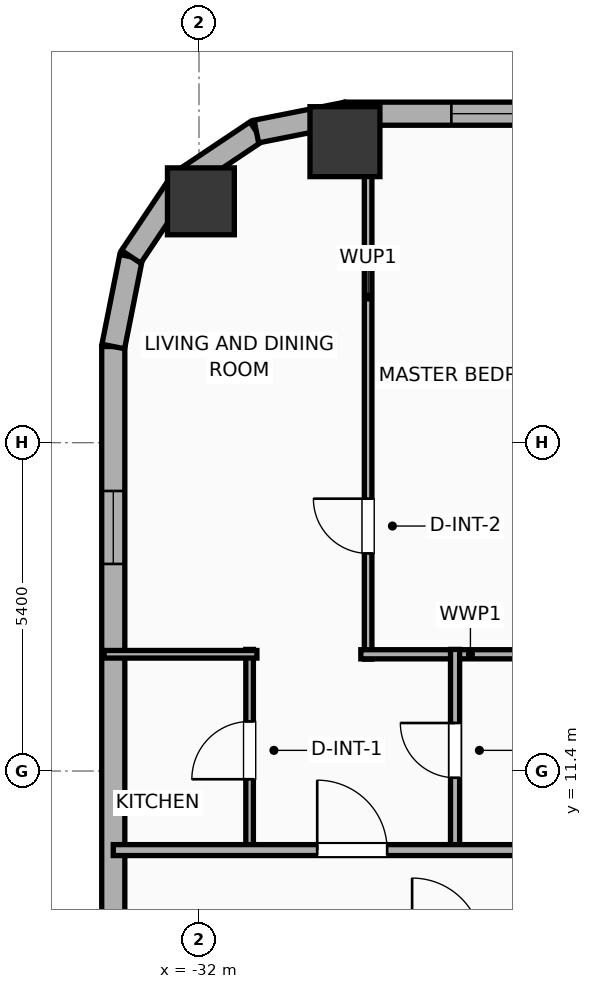
"""IFC4 building model, lengths in metres.
Left out: names, types, materials, properties, quantities, classifications, styles, units other than length and angle.
Written with IfcOpenShell. Run it as: python <this file> out.ifc"""

import sys

from ifc_helpers import new_model, si_unit, direction, frame, frame_2d, origin, origin_2d, place, context, subcontext, project, spatial, rectangle, hollow_rectangle, hollow_circle, extrude, element, fill, save


model = new_model("IFC4")
c1 = context("Model", 3, precision=1e-05, world=origin(), true_north=direction((0.0, 1.0)))
c2 = subcontext(c1, "Body", "Model", "MODEL_VIEW")
j1 = project(units=[si_unit("LENGTHUNIT", "METRE"), si_unit("PLANEANGLEUNIT", "RADIAN")], contexts=[c1])
p1 = place(None, origin())
s1 = spatial("IfcSite", under=j1, at=p1, CompositionType="ELEMENT")
p2 = place(p1, origin())
s2 = spatial("IfcBuilding", under=s1, at=p2, CompositionType="ELEMENT")
p3 = place(p2, frame((0.0, 0.0, 45.5)))
s3 = spatial("IfcBuildingStorey", under=s2, at=p3, CompositionType="ELEMENT", Elevation=45.5)
p4 = place(p3, frame((-29.6, 21.75, 0.0), z_axis=(0.0, 0.0, 1.0), x_axis=(1.0, 0.0, 0.0)))
e1 = element("IfcColumn", 1, at=p4, inside=s3, PredefinedType="COLUMN", context=c2, shape_type="SweptSolid", body=[
    extrude(hollow_rectangle(XDim=1.15, YDim=1.15, WallThickness=0.04, at=origin_2d()), origin(), (0.0, 0.0, 1.0), 3.9),
])
p5 = place(p3, frame((-31.969, 20.769, 0.0), z_axis=(0.0, 0.0, 1.0), x_axis=(1.0, 0.0, 0.0)))
e2 = element("IfcColumn", 2, at=p5, inside=s3, PredefinedType="COLUMN", context=c2, shape_type="SweptSolid", body=[
    extrude(hollow_circle(Radius=0.55, WallThickness=0.036, at=origin_2d()), origin(), (0.0, 0.0, 1.0), 3.9),
])
p6 = place(p3, frame((-33.41, -18.381, 0.0), z_axis=(0.0, 0.0, 1.0), x_axis=(0.0, 1.0, 0.0)))
e3 = element("IfcWall", 3, at=p6, inside=s3, PredefinedType="ELEMENTEDWALL", context=c2, shape_type="SweptSolid", body=[
    extrude(rectangle(XDim=36.763, YDim=0.38, at=frame_2d((18.381, 0.0))), origin(), (0.0, 0.0, 1.0), 3.65),
])
p7 = place(p6, frame((33.187, 0.0, 0.75)))
e4 = element("IfcOpeningElement", 4, at=p7, cuts=e3, PredefinedType="OPENING", context=c2, shape_type="SweptSolid", body=[
    extrude(rectangle(XDim=1.2, YDim=2.05, at=frame_2d((0.6, 1.025))), frame((0.0, 0.2, 0.0), z_axis=(0.0, -1.0, 0.0), x_axis=(1.0, 0.0, 0.0)), (0.0, 0.0, 1.0), 0.4),
])
p8 = place(p6, frame((22.126, 0.0, 0.75)))
e5 = element("IfcOpeningElement", 5, at=p8, cuts=e3, PredefinedType="OPENING", context=c2, shape_type="SweptSolid", body=[
    extrude(rectangle(XDim=1.2, YDim=2.05, at=frame_2d((0.6, 1.025))), frame((0.0, 0.2, 0.0), z_axis=(0.0, -1.0, 0.0), x_axis=(1.0, 0.0, 0.0)), (0.0, 0.0, 1.0), 0.4),
])
p9 = place(p6, frame((13.576, 0.0, 0.75)))
e6 = element("IfcOpeningElement", 6, at=p9, cuts=e3, PredefinedType="OPENING", context=c2, shape_type="SweptSolid", body=[
    extrude(rectangle(XDim=1.2, YDim=2.05, at=frame_2d((0.6, 1.025))), frame((0.0, 0.2, 0.0), z_axis=(0.0, -1.0, 0.0), x_axis=(1.0, 0.0, 0.0)), (0.0, 0.0, 1.0), 0.4),
])
p10 = place(p3, frame((-33.41, 18.381, 0.0), z_axis=(0.0, 0.0, 1.0), x_axis=(0.195086038585, 0.980786132421, 0.0)))
e7 = element("IfcWall", 7, at=p10, inside=s3, PredefinedType="ELEMENTEDWALL", context=c2, shape_type="SweptSolid", body=[
    extrude(rectangle(XDim=1.504, YDim=0.38, at=frame_2d((0.752, 0.0))), origin(), (0.0, 0.0, 1.0), 3.65),
])
p11 = place(p3, frame((-33.116, 19.857, 0.0), z_axis=(0.0, 0.0, 1.0), x_axis=(0.555572577804, 0.831468045563, 0.0)))
e8 = element("IfcWall", 8, at=p11, inside=s3, PredefinedType="ELEMENTEDWALL", context=c2, shape_type="SweptSolid", body=[
    extrude(rectangle(XDim=1.485, YDim=0.38, at=frame_2d((0.742, 0.0))), origin(), (0.0, 0.0, 1.0), 3.65),
])
p12 = place(p3, frame((-32.292, 21.091, 0.0), z_axis=(0.0, 0.0, 1.0), x_axis=(0.831442848281, 0.555610286119, 0.0)))
e9 = element("IfcWall", 9, at=p12, inside=s3, PredefinedType="ELEMENTEDWALL", context=c2, shape_type="SweptSolid", body=[
    extrude(rectangle(XDim=1.485, YDim=0.38, at=frame_2d((0.743, 0.0))), origin(), (0.0, 0.0, 1.0), 3.65),
])
p13 = place(p3, frame((-31.057, 21.917, 0.0), z_axis=(0.0, 0.0, 1.0), x_axis=(0.980786132421, 0.195086038585, 0.0)))
e10 = element("IfcWall", 10, at=p13, inside=s3, PredefinedType="ELEMENTEDWALL", context=c2, shape_type="SweptSolid", body=[
    extrude(rectangle(XDim=1.504, YDim=0.38, at=frame_2d((0.752, 0.0))), origin(), (0.0, 0.0, 1.0), 3.65),
])
p14 = place(p3, frame((-29.581, 22.21, 0.0), z_axis=(0.0, 0.0, 1.0), x_axis=(1.0, 0.0, 0.0)))
e11 = element("IfcWall", 11, at=p14, inside=s3, PredefinedType="ELEMENTEDWALL", context=c2, shape_type="SweptSolid", body=[
    extrude(rectangle(XDim=51.963, YDim=0.38, at=frame_2d((25.981, 0.0))), origin(), (0.0, 0.0, 1.0), 3.65),
])
p15 = place(p14, frame((25.631, 0.0, 0.75)))
e12 = element("IfcOpeningElement", 12, at=p15, cuts=e11, PredefinedType="OPENING", context=c2, shape_type="SweptSolid", body=[
    extrude(rectangle(XDim=2.4, YDim=2.1, at=frame_2d((1.2, 1.05))), frame((0.0, 0.2, 0.0), z_axis=(0.0, -1.0, 0.0), x_axis=(1.0, 0.0, 0.0)), (0.0, 0.0, 1.0), 0.4),
])
p16 = place(p14, frame((42.952, 0.0, 0.75)))
e13 = element("IfcOpeningElement", 13, at=p16, cuts=e11, PredefinedType="OPENING", context=c2, shape_type="SweptSolid", body=[
    extrude(rectangle(XDim=2.4, YDim=2.1, at=frame_2d((1.2, 1.05))), frame((0.0, 0.2, 0.0), z_axis=(0.0, -1.0, 0.0), x_axis=(1.0, 0.0, 0.0)), (0.0, 0.0, 1.0), 0.4),
])
p17 = place(p14, frame((1.731, 0.0, 0.75)))
e14 = element("IfcOpeningElement", 14, at=p17, cuts=e11, PredefinedType="OPENING", context=c2, shape_type="SweptSolid", body=[
    extrude(rectangle(XDim=1.2, YDim=2.05, at=frame_2d((0.6, 1.025))), frame((0.0, 0.2, 0.0), z_axis=(0.0, -1.0, 0.0), x_axis=(1.0, 0.0, 0.0)), (0.0, 0.0, 1.0), 0.4),
])
p18 = place(p14, frame((5.272, 0.0, 0.75)))
e15 = element("IfcOpeningElement", 15, at=p18, cuts=e11, PredefinedType="OPENING", context=c2, shape_type="SweptSolid", body=[
    extrude(rectangle(XDim=1.2, YDim=2.05, at=frame_2d((0.6, 1.025))), frame((0.0, 0.2, 0.0), z_axis=(0.0, -1.0, 0.0), x_axis=(1.0, 0.0, 0.0)), (0.0, 0.0, 1.0), 0.4),
])
p19 = place(p14, frame((8.356, 0.0, 0.75)))
e16 = element("IfcOpeningElement", 16, at=p19, cuts=e11, PredefinedType="OPENING", context=c2, shape_type="SweptSolid", body=[
    extrude(rectangle(XDim=1.2, YDim=2.05, at=frame_2d((0.6, 1.025))), frame((0.0, 0.2, 0.0), z_axis=(0.0, -1.0, 0.0), x_axis=(1.0, 0.0, 0.0)), (0.0, 0.0, 1.0), 0.4),
])
p20 = place(p14, frame((15.632, 0.0, 0.75)))
e17 = element("IfcOpeningElement", 17, at=p20, cuts=e11, PredefinedType="OPENING", context=c2, shape_type="SweptSolid", body=[
    extrude(rectangle(XDim=1.2, YDim=2.05, at=frame_2d((0.6, 1.025))), frame((0.0, 0.2, 0.0), z_axis=(0.0, -1.0, 0.0), x_axis=(1.0, 0.0, 0.0)), (0.0, 0.0, 1.0), 0.4),
])
p21 = place(p14, frame((12.137, 0.0, 0.75)))
e18 = element("IfcOpeningElement", 18, at=p21, cuts=e11, PredefinedType="OPENING", context=c2, shape_type="SweptSolid", body=[
    extrude(rectangle(XDim=1.2, YDim=2.05, at=frame_2d((0.6, 1.025))), frame((0.0, 0.2, 0.0), z_axis=(0.0, -1.0, 0.0), x_axis=(1.0, 0.0, 0.0)), (0.0, 0.0, 1.0), 0.4),
])
p22 = place(p14, frame((18.756, 0.0, 0.75)))
e19 = element("IfcOpeningElement", 19, at=p22, cuts=e11, PredefinedType="OPENING", context=c2, shape_type="SweptSolid", body=[
    extrude(rectangle(XDim=1.2, YDim=2.05, at=frame_2d((0.6, 1.025))), frame((0.0, 0.2, 0.0), z_axis=(0.0, -1.0, 0.0), x_axis=(1.0, 0.0, 0.0)), (0.0, 0.0, 1.0), 0.4),
])
p23 = place(p14, frame((22.907, 0.0, 0.75)))
e20 = element("IfcOpeningElement", 20, at=p23, cuts=e11, PredefinedType="OPENING", context=c2, shape_type="SweptSolid", body=[
    extrude(rectangle(XDim=1.2, YDim=2.05, at=frame_2d((0.6, 1.025))), frame((0.0, 0.2, 0.0), z_axis=(0.0, -1.0, 0.0), x_axis=(1.0, 0.0, 0.0)), (0.0, 0.0, 1.0), 0.4),
])
p24 = place(p14, frame((36.381, 0.0, 0.75)))
e21 = element("IfcOpeningElement", 21, at=p24, cuts=e11, PredefinedType="OPENING", context=c2, shape_type="SweptSolid", body=[
    extrude(rectangle(XDim=1.2, YDim=2.05, at=frame_2d((0.6, 1.025))), frame((0.0, 0.2, 0.0), z_axis=(0.0, -1.0, 0.0), x_axis=(1.0, 0.0, 0.0)), (0.0, 0.0, 1.0), 0.4),
])
p25 = place(p14, frame((32.886, 0.0, 0.75)))
e22 = element("IfcOpeningElement", 22, at=p25, cuts=e11, PredefinedType="OPENING", context=c2, shape_type="SweptSolid", body=[
    extrude(rectangle(XDim=1.2, YDim=2.05, at=frame_2d((0.6, 1.025))), frame((0.0, 0.2, 0.0), z_axis=(0.0, -1.0, 0.0), x_axis=(1.0, 0.0, 0.0)), (0.0, 0.0, 1.0), 0.4),
])
p26 = place(p14, frame((39.556, 0.0, 0.75)))
e23 = element("IfcOpeningElement", 23, at=p26, cuts=e11, PredefinedType="OPENING", context=c2, shape_type="SweptSolid", body=[
    extrude(rectangle(XDim=1.2, YDim=2.05, at=frame_2d((0.6, 1.025))), frame((0.0, 0.2, 0.0), z_axis=(0.0, -1.0, 0.0), x_axis=(1.0, 0.0, 0.0)), (0.0, 0.0, 1.0), 0.4),
])
p27 = place(p14, frame((46.885, 0.0, 0.75)))
e24 = element("IfcOpeningElement", 24, at=p27, cuts=e11, PredefinedType="OPENING", context=c2, shape_type="SweptSolid", body=[
    extrude(rectangle(XDim=1.2, YDim=2.05, at=frame_2d((0.6, 1.025))), frame((0.0, 0.2, 0.0), z_axis=(0.0, -1.0, 0.0), x_axis=(1.0, 0.0, 0.0)), (0.0, 0.0, 1.0), 0.4),
])
p28 = place(p14, frame((49.531, 0.0, 0.75)))
e25 = element("IfcOpeningElement", 25, at=p28, cuts=e11, PredefinedType="OPENING", context=c2, shape_type="SweptSolid", body=[
    extrude(rectangle(XDim=1.2, YDim=2.05, at=frame_2d((0.6, 1.025))), frame((0.0, 0.2, 0.0), z_axis=(0.0, -1.0, 0.0), x_axis=(1.0, 0.0, 0.0)), (0.0, 0.0, 1.0), 0.4),
])
p29 = place(p3, frame((-29.219, 13.24, 0.0), z_axis=(0.0, 0.0, 1.0), x_axis=(0.0, 1.0, 0.0)))
e26 = element("IfcWall", 26, at=p29, inside=s3, PredefinedType="PARTITIONING", context=c2, shape_type="SweptSolid", body=[
    extrude(rectangle(XDim=9.12, YDim=0.125, at=frame_2d((4.56, 0.0))), origin(), (0.0, 0.0, 1.0), 3.65),
])
p30 = place(p29, frame((1.739, 0.0, 0.0)))
e27 = element("IfcOpeningElement", 27, at=p30, cuts=e26, PredefinedType="OPENING", context=c2, shape_type="SweptSolid", body=[
    extrude(rectangle(XDim=0.9, YDim=2.05, at=frame_2d((0.45, 1.025))), frame((0.0, 0.073, 0.0), z_axis=(0.0, -1.0, 0.0), x_axis=(1.0, 0.0, 0.0)), (0.0, 0.0, 1.0), 0.145),
])
p31 = place(p3, frame((-29.339, 13.32, 0.0), z_axis=(0.0, 0.0, 1.0), x_axis=(1.0, 0.0, 0.0)))
e28 = element("IfcWall", 28, at=p31, inside=s3, PredefinedType="PLUMBINGWALL", context=c2, shape_type="SweptSolid", body=[
    extrude(rectangle(XDim=3.605, YDim=0.15, at=frame_2d((1.803, 0.0))), origin(), (0.0, 0.0, 1.0), 3.65),
])
p32 = place(p3, frame((-31.168, 10.08, 0.0), z_axis=(0.0, 0.0, 1.0), x_axis=(0.0, 1.0, 0.0)))
e29 = element("IfcWall", 29, at=p32, inside=s3, PredefinedType="PARTITIONING", context=c2, shape_type="SweptSolid", body=[
    extrude(rectangle(XDim=3.32, YDim=0.125, at=frame_2d((1.66, 0.0))), origin(), (0.0, 0.0, 1.0), 3.65),
])
p33 = place(p32, frame((1.185, 0.0, 0.0)))
e30 = element("IfcOpeningElement", 30, at=p33, cuts=e29, PredefinedType="OPENING", context=c2, shape_type="SweptSolid", body=[
    extrude(rectangle(XDim=0.95, YDim=2.05, at=frame_2d((0.475, 1.025))), frame((0.0, 0.073, 0.0), z_axis=(0.0, -1.0, 0.0), x_axis=(1.0, 0.0, 0.0)), (0.0, 0.0, 1.0), 0.145),
])
p34 = place(p3, frame((-33.56, 13.32, 0.0), z_axis=(0.0, 0.0, 1.0), x_axis=(1.0, 0.0, 0.0)))
e31 = element("IfcWall", 31, at=p34, inside=s3, PredefinedType="PARTITIONING", context=c2, shape_type="SweptSolid", body=[
    extrude(rectangle(XDim=2.512, YDim=0.125, at=frame_2d((1.256, 0.0))), origin(), (0.0, 0.0, 1.0), 3.65),
])
p35 = place(p3, frame((-27.789, 10.08, 0.0), z_axis=(0.0, 0.0, 1.0), x_axis=(0.0, 1.0, 0.0)))
e32 = element("IfcWall", 32, at=p35, inside=s3, PredefinedType="PLUMBINGWALL", context=c2, shape_type="SweptSolid", body=[
    extrude(rectangle(XDim=3.32, YDim=0.15, at=frame_2d((1.66, 0.0))), origin(), (0.0, 0.0, 1.0), 3.65),
])
p36 = place(p35, frame((1.21, 0.0, 0.0)))
e33 = element("IfcOpeningElement", 33, at=p36, cuts=e32, PredefinedType="OPENING", context=c2, shape_type="SweptSolid", body=[
    extrude(rectangle(XDim=0.9, YDim=2.05, at=frame_2d((0.45, 1.025))), frame((0.0, 0.085, 0.0), z_axis=(0.0, -1.0, 0.0), x_axis=(1.0, 0.0, 0.0)), (0.0, 0.0, 1.0), 0.17),
])
p37 = place(p3, frame((-33.41, 10.1, 0.0), z_axis=(0.0, 0.0, 1.0), x_axis=(1.0, 0.0, 0.0)))
e34 = element("IfcWall", 34, at=p37, inside=s3, PredefinedType="PARTITIONING", context=c2, shape_type="SweptSolid", body=[
    extrude(rectangle(XDim=59.62, YDim=0.18, at=frame_2d((29.81, 0.0))), origin(), (0.0, 0.0, 1.0), 3.65),
])
p38 = place(p37, frame((3.354, 0.0, 0.0)))
e35 = element("IfcOpeningElement", 35, at=p38, cuts=e34, PredefinedType="OPENING", context=c2, shape_type="SweptSolid", body=[
    extrude(rectangle(XDim=1.15, YDim=2.05, at=frame_2d((0.575, 1.025))), frame((0.0, 0.1, 0.0), z_axis=(0.0, -1.0, 0.0), x_axis=(1.0, 0.0, 0.0)), (0.0, 0.0, 1.0), 0.2),
])
p39 = place(p37, frame((10.997, 0.0, 0.0)))
e36 = element("IfcOpeningElement", 36, at=p39, cuts=e34, PredefinedType="OPENING", context=c2, shape_type="SweptSolid", body=[
    extrude(rectangle(XDim=1.15, YDim=2.05, at=frame_2d((0.575, 1.025))), frame((0.0, 0.1, 0.0), z_axis=(0.0, -1.0, 0.0), x_axis=(1.0, 0.0, 0.0)), (0.0, 0.0, 1.0), 0.2),
])
p40 = place(p37, frame((20.232, 0.0, 0.0)))
e37 = element("IfcOpeningElement", 37, at=p40, cuts=e34, PredefinedType="OPENING", context=c2, shape_type="SweptSolid", body=[
    extrude(rectangle(XDim=1.15, YDim=2.05, at=frame_2d((0.575, 1.025))), frame((0.0, 0.1, 0.0), z_axis=(0.0, -1.0, 0.0), x_axis=(1.0, 0.0, 0.0)), (0.0, 0.0, 1.0), 0.2),
])
p41 = place(p37, frame((30.38, 0.0, 0.0)))
e38 = element("IfcOpeningElement", 38, at=p41, cuts=e34, PredefinedType="OPENING", context=c2, shape_type="SweptSolid", body=[
    extrude(rectangle(XDim=1.15, YDim=2.05, at=frame_2d((0.575, 1.025))), frame((0.0, 0.1, 0.0), z_axis=(0.0, -1.0, 0.0), x_axis=(1.0, 0.0, 0.0)), (0.0, 0.0, 1.0), 0.2),
])
p42 = place(p37, frame((40.998, 0.0, 0.0)))
e39 = element("IfcOpeningElement", 39, at=p42, cuts=e34, PredefinedType="OPENING", context=c2, shape_type="SweptSolid", body=[
    extrude(rectangle(XDim=1.15, YDim=2.05, at=frame_2d((0.575, 1.025))), frame((0.0, 0.1, 0.0), z_axis=(0.0, -1.0, 0.0), x_axis=(1.0, 0.0, 0.0)), (0.0, 0.0, 1.0), 0.2),
])
p43 = place(p37, frame((49.428, 0.0, 0.0)))
e40 = element("IfcOpeningElement", 40, at=p43, cuts=e34, PredefinedType="OPENING", context=c2, shape_type="SweptSolid", body=[
    extrude(rectangle(XDim=0.9, YDim=2.05, at=frame_2d((0.45, 1.025))), frame((0.0, 0.1, 0.0), z_axis=(0.0, -1.0, 0.0), x_axis=(1.0, 0.0, 0.0)), (0.0, 0.0, 1.0), 0.2),
])
p44 = place(p37, frame((56.07, 0.0, 0.0)))
e41 = element("IfcOpeningElement", 41, at=p44, cuts=e34, PredefinedType="OPENING", context=c2, shape_type="SweptSolid", body=[
    extrude(rectangle(XDim=0.9, YDim=2.05, at=frame_2d((0.45, 1.025))), frame((0.0, 0.1, 0.0), z_axis=(0.0, -1.0, 0.0), x_axis=(1.0, 0.0, 0.0)), (0.0, 0.0, 1.0), 0.2),
])
p45 = place(p7, origin())
e42 = element("IfcWindow", 42, at=p45, inside=s3, PartitioningType="SINGLE_PANEL", PredefinedType="WINDOW", context=c2, shape_type="SweptSolid", body=[
    extrude(rectangle(XDim=1.2, YDim=2.05, at=frame_2d((0.6, 1.025))), frame((0.0, 0.03, 0.0), z_axis=(0.0, -1.0, 0.0), x_axis=(1.0, 0.0, 0.0)), (0.0, 0.0, 1.0), 0.06),
])
fill(e4, e42)
p46 = place(p17, origin())
e43 = element("IfcWindow", 43, at=p46, inside=s3, PartitioningType="SINGLE_PANEL", PredefinedType="WINDOW", context=c2, shape_type="SweptSolid", body=[
    extrude(rectangle(XDim=1.2, YDim=2.05, at=frame_2d((0.6, 1.025))), frame((0.0, 0.03, 0.0), z_axis=(0.0, -1.0, 0.0), x_axis=(1.0, 0.0, 0.0)), (0.0, 0.0, 1.0), 0.06),
])
fill(e14, e43)
p47 = place(p30, origin())
e44 = element("IfcDoor", 44, at=p47, inside=s3, OperationType="SINGLE_SWING_RIGHT", PredefinedType="DOOR", context=c2, shape_type="SweptSolid", body=[
    extrude(rectangle(XDim=0.9, YDim=2.05, at=frame_2d((0.45, 1.025))), frame((0.0, 0.025, 0.0), z_axis=(0.0, -1.0, 0.0), x_axis=(1.0, 0.0, 0.0)), (0.0, 0.0, 1.0), 0.05),
])
fill(e27, e44)
p48 = place(p33, origin())
e45 = element("IfcDoor", 45, at=p48, inside=s3, OperationType="SINGLE_SWING_LEFT", PredefinedType="DOOR", context=c2, shape_type="SweptSolid", body=[
    extrude(rectangle(XDim=0.95, YDim=2.05, at=frame_2d((0.475, 1.025))), frame((0.0, 0.025, 0.0), z_axis=(0.0, -1.0, 0.0), x_axis=(1.0, 0.0, 0.0)), (0.0, 0.0, 1.0), 0.05),
])
fill(e30, e45)
p49 = place(p36, origin())
e46 = element("IfcDoor", 46, at=p49, inside=s3, OperationType="SINGLE_SWING_RIGHT", PredefinedType="DOOR", context=c2, shape_type="SweptSolid", body=[
    extrude(rectangle(XDim=0.9, YDim=2.05, at=frame_2d((0.45, 1.025))), frame((0.0, 0.025, 0.0), z_axis=(0.0, -1.0, 0.0), x_axis=(1.0, 0.0, 0.0)), (0.0, 0.0, 1.0), 0.05),
])
fill(e33, e46)
p50 = place(p38, origin())
e47 = element("IfcDoor", 47, at=p50, inside=s3, OperationType="SINGLE_SWING_LEFT", PredefinedType="DOOR", context=c2, shape_type="SweptSolid", body=[
    extrude(rectangle(XDim=1.15, YDim=2.05, at=frame_2d((0.575, 1.025))), frame((0.0, 0.025, 0.0), z_axis=(0.0, -1.0, 0.0), x_axis=(1.0, 0.0, 0.0)), (0.0, 0.0, 1.0), 0.05),
])
fill(e35, e47)
save(model, sys.argv[1])
